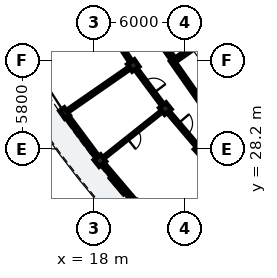
"""IFC4 building model, lengths in metres.
Left out: names, types, materials, properties, quantities, classifications, styles, units other than length and angle.
Written with IfcOpenShell. Run it as: python <this file> out.ifc"""

import sys

from ifc_helpers import new_model, si_unit, direction, frame, frame_2d, origin, origin_2d, place, context, subcontext, project, spatial, rectangle, extrude, element, fill, save


model = new_model("IFC4")
c1 = context("Model", 3, precision=1e-05, world=origin(), true_north=direction((0.0, 1.0)))
c2 = subcontext(c1, "Body", "Model", "MODEL_VIEW")
j1 = project(units=[si_unit("LENGTHUNIT", "METRE"), si_unit("PLANEANGLEUNIT", "RADIAN")], contexts=[c1])
p1 = place(None, origin())
s1 = spatial("IfcSite", under=j1, at=p1, CompositionType="ELEMENT")
p2 = place(p1, origin())
s2 = spatial("IfcBuilding", under=s1, at=p2, CompositionType="ELEMENT")
p3 = place(p2, frame((0.0, 0.0, 22.28)))
s3 = spatial("IfcBuildingStorey", under=s2, at=p3, CompositionType="ELEMENT", Elevation=22.28)
p4 = place(p3, frame((25.083, 31.24, 0.0), z_axis=(0.0, 0.0, 1.0), x_axis=(-0.573582112484, 0.819148069789, 0.0)))
e1 = element("IfcWall", 1, at=p4, inside=s3, PredefinedType="SHEAR", context=c2, shape_type="SweptSolid", body=[
    extrude(rectangle(XDim=3.42, YDim=0.25, at=frame_2d((1.71, 0.0))), origin(), (0.0, 0.0, 1.0), 3.11),
])
p5 = place(p3, frame((23.296, 34.01, 0.0), z_axis=(0.0, 0.0, 1.0), x_axis=(0.819153711596, 0.573574055182, 0.0)))
e2 = element("IfcWall", 2, at=p5, inside=s3, PredefinedType="SHEAR", context=c2, shape_type="SweptSolid", body=[
    extrude(rectangle(XDim=6.6, YDim=0.25, at=frame_2d((3.3, 0.0))), origin(), (0.0, 0.0, 1.0), 3.11),
])
p6 = place(p5, frame((0.22, 0.0, 0.0)))
e3 = element("IfcOpeningElement", 3, at=p6, cuts=e2, PredefinedType="OPENING", context=c2, shape_type="SweptSolid", body=[
    extrude(rectangle(XDim=1.05, YDim=2.15, at=frame_2d((0.525, 1.075))), frame((0.0, 0.135, 0.0), z_axis=(0.0, -1.0, 0.0), x_axis=(1.0, 0.0, 0.0)), (0.0, 0.0, 1.0), 0.27),
])
p7 = place(p3, frame((20.59, 33.692, 0.0), z_axis=(0.0, 0.0, 1.0), x_axis=(-0.821646937942, -0.569996762596, 0.0)))
e4 = element("IfcColumn", 4, at=p7, inside=s3, PredefinedType="COLUMN", context=c2, shape_type="SweptSolid", body=[
    extrude(rectangle(XDim=0.56, YDim=0.56, at=origin_2d()), origin(), (0.0, 0.0, 1.0), 3.11),
])
p8 = place(p3, frame((16.071, 30.557, 0.0), z_axis=(0.0, 0.0, 1.0), x_axis=(-0.821646937942, -0.569996762596, 0.0)))
e5 = element("IfcColumn", 5, at=p8, inside=s3, PredefinedType="PILASTER", context=c2, shape_type="SweptSolid", body=[
    extrude(rectangle(XDim=0.38, YDim=0.62, at=origin_2d()), origin(), (0.0, 0.0, 1.0), 3.11),
])
for number, where, z_axis, x_axis in (
    (6, (22.7, 30.853, 0.0), (0.0, 0.0, 1.0), (-0.783, -0.623, 0.0)),
    (7, (18.396, 27.429, 0.0), (0.0, 0.0, 1.0), (-0.783, -0.623, 0.0)),
    (8, (24.991, 28.159, 0.0), (0.0, 0.0, 1.0), (-0.74, -0.672, 0.0)),
):
    element("IfcColumn", number, at=place(p3, frame(where, z_axis=z_axis, x_axis=x_axis)), inside=s3, PredefinedType="COLUMN", context=c2, shape_type="SweptSolid", body=[
        extrude(rectangle(XDim=0.56, YDim=0.56, at=origin_2d()), origin(), (0.0, 0.0, 1.0), 3.11),
    ])
p9 = place(p3, frame((16.166, 30.428, 0.0), z_axis=(0.0, 0.0, 1.0), x_axis=(0.596611432616, -0.802530247699, 0.0)))
e9 = element("IfcWall", 9, at=p9, inside=s3, PredefinedType="SOLIDWALL", context=c2, shape_type="SweptSolid", body=[
    extrude(rectangle(XDim=3.487, YDim=0.245, at=frame_2d((1.743, 0.0))), origin(), (0.0, 0.0, 1.0), 2.355),
])
p10 = place(p9, frame((0.943, 0.0, 0.55)))
e10 = element("IfcOpeningElement", 10, at=p10, cuts=e9, PredefinedType="OPENING", context=c2, shape_type="SweptSolid", body=[
    extrude(rectangle(XDim=1.6, YDim=1.535, at=frame_2d((0.8, 0.768))), frame((0.0, 0.133, 0.0), z_axis=(0.0, -1.0, 0.0), x_axis=(1.0, 0.0, 0.0)), (0.0, 0.0, 1.0), 0.265),
])
p11 = place(p3, frame((18.558, 27.239, 0.0), z_axis=(0.0, 0.0, 1.0), x_axis=(0.647811002696, -0.761801092665, 0.0)))
e11 = element("IfcWall", 11, at=p11, inside=s3, PredefinedType="SOLIDWALL", context=c2, shape_type="SweptSolid", body=[
    extrude(rectangle(XDim=3.487, YDim=0.245, at=frame_2d((1.743, 0.0))), origin(), (0.0, 0.0, 1.0), 2.355),
])
p12 = place(p11, frame((0.883, 0.0, 0.55)))
e12 = element("IfcOpeningElement", 12, at=p12, cuts=e11, PredefinedType="OPENING", context=c2, shape_type="SweptSolid", body=[
    extrude(rectangle(XDim=1.72, YDim=1.61, at=frame_2d((0.86, 0.805))), frame((0.0, 0.133, 0.0), z_axis=(0.0, -1.0, 0.0), x_axis=(1.0, 0.0, 0.0)), (0.0, 0.0, 1.0), 0.265),
])
p13 = place(p3, frame((23.195, 34.068, 0.0), z_axis=(0.0, 0.0, 1.0), x_axis=(-0.573572687386, 0.819154669329, 0.0)))
e13 = element("IfcWall", 13, at=p13, inside=s3, PredefinedType="PARTITIONING", context=c2, shape_type="SweptSolid", body=[
    extrude(rectangle(XDim=4.9, YDim=0.22, at=frame_2d((2.45, 0.0))), origin(), (0.0, 0.0, 1.0), 2.34),
])
p14 = place(p13, frame((1.95, 0.0, 0.0)))
e14 = element("IfcOpeningElement", 14, at=p14, cuts=e13, PredefinedType="OPENING", context=c2, shape_type="SweptSolid", body=[
    extrude(rectangle(XDim=1.0, YDim=2.15, at=frame_2d((0.5, 1.075))), frame((0.0, 0.12, 0.0), z_axis=(0.0, -1.0, 0.0), x_axis=(1.0, 0.0, 0.0)), (0.0, 0.0, 1.0), 0.24),
])
p15 = place(p3, frame((18.86, 36.368, 0.0), z_axis=(0.0, 0.0, 1.0), x_axis=(0.542787304957, -0.83987019329, 0.0)))
e15 = element("IfcWall", 15, at=p15, inside=s3, PredefinedType="PARTITIONING", context=c2, shape_type="SweptSolid", body=[
    extrude(rectangle(XDim=2.837, YDim=0.195, at=frame_2d((1.418, 0.0))), origin(), (0.0, 0.0, 1.0), 2.37),
])
p16 = place(p15, frame((0.924, 0.0, 0.0)))
e16 = element("IfcOpeningElement", 16, at=p16, cuts=e15, PredefinedType="OPENING", context=c2, shape_type="SweptSolid", body=[
    extrude(rectangle(XDim=0.99, YDim=2.16, at=frame_2d((0.495, 1.08))), frame((0.0, 0.107, 0.0), z_axis=(0.0, -1.0, 0.0), x_axis=(1.0, 0.0, 0.0)), (0.0, 0.0, 1.0), 0.215),
])
p17 = place(p3, frame((20.261, 33.464, 0.0), z_axis=(0.0, 0.0, 1.0), x_axis=(-0.821638260647, -0.570009270663, 0.0)))
e17 = element("IfcWall", 17, at=p17, inside=s3, PredefinedType="PARTITIONING", context=c2, shape_type="SweptSolid", body=[
    extrude(rectangle(XDim=4.7, YDim=0.175, at=frame_2d((2.35, 0.0))), origin(), (0.0, 0.0, 1.0), 2.37),
])
p18 = place(p3, frame((20.799, 33.411, 0.0), z_axis=(0.0, 0.0, 1.0), x_axis=(0.596552136601, -0.802574325727, 0.0)))
e18 = element("IfcWall", 18, at=p18, inside=s3, PredefinedType="PARTITIONING", context=c2, shape_type="SweptSolid", body=[
    extrude(rectangle(XDim=2.837, YDim=0.195, at=frame_2d((1.418, 0.0))), origin(), (0.0, 0.0, 1.0), 2.37),
])
p19 = place(p18, frame((0.934, 0.0, 0.0)))
e19 = element("IfcOpeningElement", 19, at=p19, cuts=e18, PredefinedType="OPENING", context=c2, shape_type="SweptSolid", body=[
    extrude(rectangle(XDim=0.97, YDim=2.15, at=frame_2d((0.485, 1.075))), frame((0.0, 0.107, 0.0), z_axis=(0.0, -1.0, 0.0), x_axis=(1.0, 0.0, 0.0)), (0.0, 0.0, 1.0), 0.215),
])
p20 = place(p3, frame((22.387, 30.604, 0.0), z_axis=(0.0, 0.0, 1.0), x_axis=(-0.782609106384, -0.622513442911, 0.0)))
e20 = element("IfcWall", 20, at=p20, inside=s3, PredefinedType="PARTITIONING", context=c2, shape_type="SweptSolid", body=[
    extrude(rectangle(XDim=4.7, YDim=0.125, at=frame_2d((2.35, 0.0))), origin(), (0.0, 0.0, 1.0), 2.37),
])
p21 = place(p20, frame((1.915, 0.0, 0.0)))
e21 = element("IfcOpeningElement", 21, at=p21, cuts=e20, PredefinedType="OPENING", context=c2, shape_type="SweptSolid", body=[
    extrude(rectangle(XDim=0.87, YDim=2.08, at=frame_2d((0.435, 1.04))), frame((0.0, 0.073, 0.0), z_axis=(0.0, -1.0, 0.0), x_axis=(1.0, 0.0, 0.0)), (0.0, 0.0, 1.0), 0.145),
])
p22 = place(p3, frame((22.927, 30.586, 0.0), z_axis=(0.0, 0.0, 1.0), x_axis=(0.64778830669, -0.761820392032, 0.0)))
e22 = element("IfcWall", 22, at=p22, inside=s3, PredefinedType="PARTITIONING", context=c2, shape_type="SweptSolid", body=[
    extrude(rectangle(XDim=2.837, YDim=0.195, at=frame_2d((1.418, 0.0))), origin(), (0.0, 0.0, 1.0), 2.37),
])
p23 = place(p22, frame((0.944, 0.0, 0.0)))
e23 = element("IfcOpeningElement", 23, at=p23, cuts=e22, PredefinedType="OPENING", context=c2, shape_type="SweptSolid", body=[
    extrude(rectangle(XDim=0.95, YDim=2.13, at=frame_2d((0.475, 1.065))), frame((0.0, 0.107, 0.0), z_axis=(0.0, -1.0, 0.0), x_axis=(1.0, 0.0, 0.0)), (0.0, 0.0, 1.0), 0.215),
])
p24 = place(p3, frame((27.176, 25.332, 0.0), z_axis=(0.0, 0.0, 1.0), x_axis=(-0.69466218314, -0.719336118456, 0.0)))
e24 = element("IfcWall", 24, at=p24, inside=s3, PredefinedType="PARTITIONING", context=c2, shape_type="SweptSolid", body=[
    extrude(rectangle(XDim=4.7, YDim=0.125, at=frame_2d((2.35, 0.0))), origin(), (0.0, 0.0, 1.0), 2.37),
])
p25 = place(p24, frame((1.905, 0.0, 0.0)))
e25 = element("IfcOpeningElement", 25, at=p25, cuts=e24, PredefinedType="OPENING", context=c2, shape_type="SweptSolid", body=[
    extrude(rectangle(XDim=0.89, YDim=2.1, at=frame_2d((0.445, 1.05))), frame((0.0, 0.073, 0.0), z_axis=(0.0, -1.0, 0.0), x_axis=(1.0, 0.0, 0.0)), (0.0, 0.0, 1.0), 0.145),
])
p26 = place(p10, origin())
e26 = element("IfcWindow", 26, at=p26, inside=s3, PartitioningType="SINGLE_PANEL", PredefinedType="WINDOW", context=c2, shape_type="SweptSolid", body=[
    extrude(rectangle(XDim=1.6, YDim=1.535, at=frame_2d((0.8, 0.768))), frame((0.0, 0.03, 0.0), z_axis=(0.0, -1.0, 0.0), x_axis=(1.0, 0.0, 0.0)), (0.0, 0.0, 1.0), 0.06),
])
fill(e10, e26)
p27 = place(p12, origin())
e27 = element("IfcWindow", 27, at=p27, inside=s3, PartitioningType="SINGLE_PANEL", PredefinedType="WINDOW", context=c2, shape_type="SweptSolid", body=[
    extrude(rectangle(XDim=1.72, YDim=1.61, at=frame_2d((0.86, 0.805))), frame((0.0, 0.03, 0.0), z_axis=(0.0, -1.0, 0.0), x_axis=(1.0, 0.0, 0.0)), (0.0, 0.0, 1.0), 0.06),
])
fill(e12, e27)
p28 = place(p6, origin())
e28 = element("IfcDoor", 28, at=p28, inside=s3, OperationType="SINGLE_SWING_LEFT", PredefinedType="DOOR", context=c2, shape_type="SweptSolid", body=[
    extrude(rectangle(XDim=1.05, YDim=2.15, at=frame_2d((0.525, 1.075))), frame((0.0, 0.025, 0.0), z_axis=(0.0, -1.0, 0.0), x_axis=(1.0, 0.0, 0.0)), (0.0, 0.0, 1.0), 0.05),
])
fill(e3, e28)
p29 = place(p19, origin())
e29 = element("IfcDoor", 29, at=p29, inside=s3, OperationType="SINGLE_SWING_RIGHT", PredefinedType="DOOR", context=c2, shape_type="SweptSolid", body=[
    extrude(rectangle(XDim=0.97, YDim=2.15, at=frame_2d((0.485, 1.075))), frame((0.0, 0.025, 0.0), z_axis=(0.0, -1.0, 0.0), x_axis=(1.0, 0.0, 0.0)), (0.0, 0.0, 1.0), 0.05),
])
fill(e19, e29)
p30 = place(p21, origin())
e30 = element("IfcDoor", 30, at=p30, inside=s3, OperationType="SINGLE_SWING_RIGHT", PredefinedType="DOOR", context=c2, shape_type="SweptSolid", body=[
    extrude(rectangle(XDim=0.87, YDim=2.08, at=frame_2d((0.435, 1.04))), frame((0.0, 0.025, 0.0), z_axis=(0.0, -1.0, 0.0), x_axis=(1.0, 0.0, 0.0)), (0.0, 0.0, 1.0), 0.05),
])
fill(e21, e30)
p31 = place(p23, origin())
e31 = element("IfcDoor", 31, at=p31, inside=s3, OperationType="SINGLE_SWING_LEFT", PredefinedType="DOOR", context=c2, shape_type="SweptSolid", body=[
    extrude(rectangle(XDim=0.95, YDim=2.13, at=frame_2d((0.475, 1.065))), frame((0.0, 0.025, 0.0), z_axis=(0.0, -1.0, 0.0), x_axis=(1.0, 0.0, 0.0)), (0.0, 0.0, 1.0), 0.05),
])
fill(e23, e31)
save(model, sys.argv[1])
